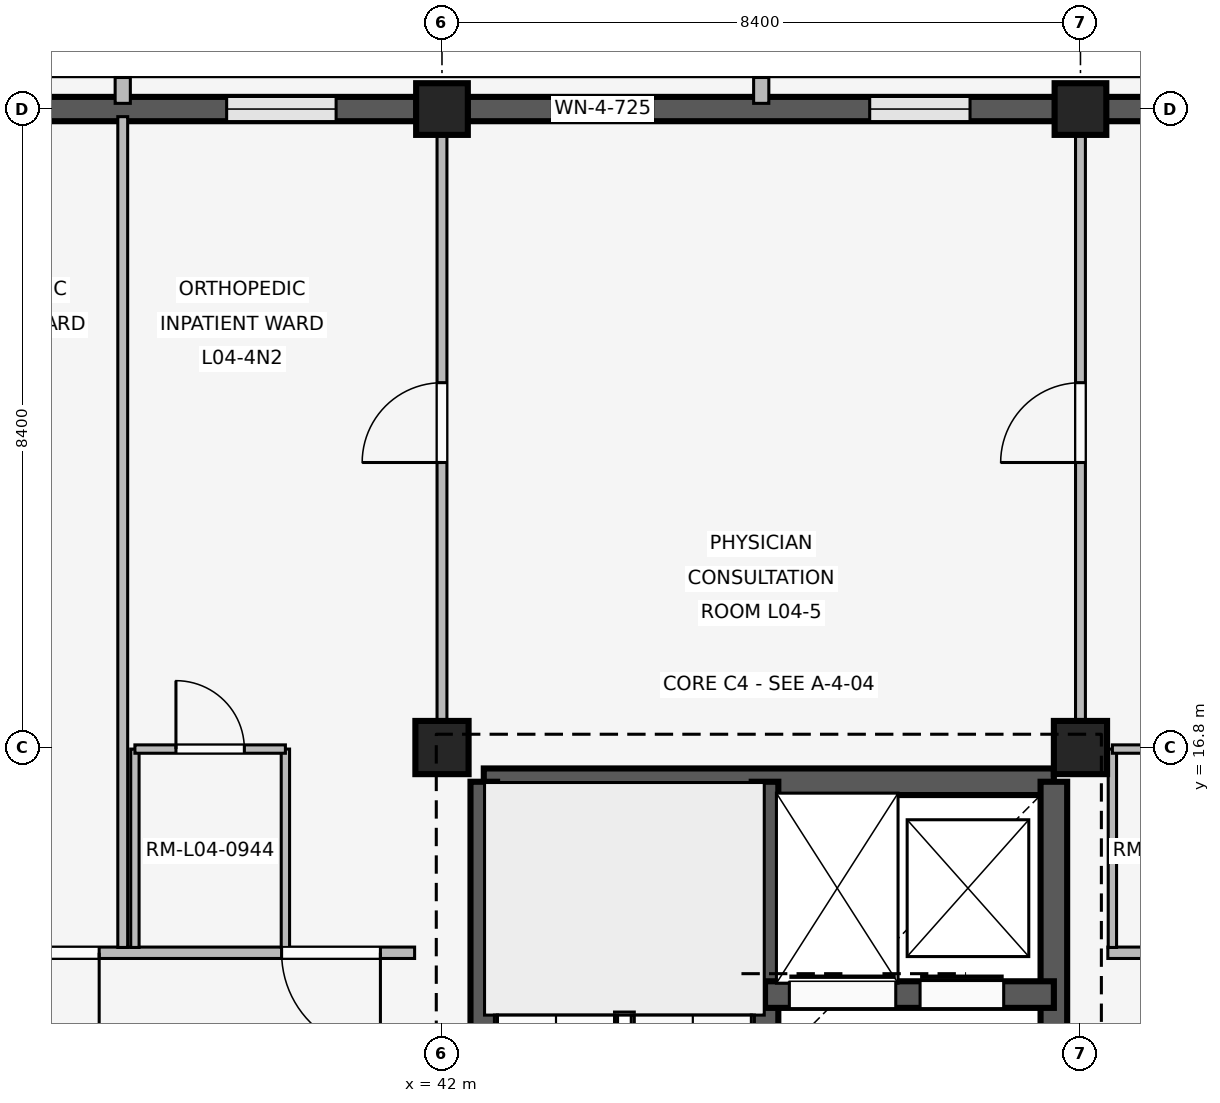
"""IFC4 building model, lengths in metres.
Left out: names, types, materials, properties, quantities, classifications, styles, units other than length and angle.
Written with IfcOpenShell. Run it as: python <this file> out.ifc"""

import sys

from ifc_helpers import new_model, si_unit, direction, frame, frame_2d, origin, origin_2d, place, context, subcontext, project, spatial, rectangle, extrude, element, fill, save


model = new_model("IFC4")
c1 = context("Model", 3, precision=1e-05, world=origin(), true_north=direction((0.0, 1.0)))
c2 = subcontext(c1, "Body", "Model", "MODEL_VIEW")
j1 = project(units=[si_unit("LENGTHUNIT", "METRE"), si_unit("PLANEANGLEUNIT", "RADIAN")], contexts=[c1])
p1 = place(None, origin())
s1 = spatial("IfcSite", under=j1, at=p1, CompositionType="ELEMENT")
p2 = place(p1, origin())
s2 = spatial("IfcBuilding", under=s1, at=p2, CompositionType="ELEMENT")
p3 = place(p2, frame((0.0, 0.0, 16.2)))
s3 = spatial("IfcBuildingStorey", under=s2, at=p3, CompositionType="ELEMENT", Elevation=16.2)
p4 = place(p3, frame((42.0, 16.8, 0.0), z_axis=(0.0, 0.0, 1.0), x_axis=(1.0, 0.0, 0.0)))
e1 = element("IfcColumn", 1, at=p4, inside=s3, PredefinedType="COLUMN", context=c2, shape_type="SweptSolid", body=[
    extrude(rectangle(XDim=0.7, YDim=0.7, at=origin_2d()), origin(), (0.0, 0.0, 1.0), 4.2),
])
p5 = place(p3, frame((42.0, 25.2, 0.0), z_axis=(0.0, 0.0, 1.0), x_axis=(1.0, 0.0, 0.0)))
e2 = element("IfcColumn", 2, at=p5, inside=s3, PredefinedType="COLUMN", context=c2, shape_type="SweptSolid", body=[
    extrude(rectangle(XDim=0.68, YDim=0.68, at=origin_2d()), origin(), (0.0, 0.0, 1.0), 4.2),
])
p6 = place(p3, frame((50.4, 16.8, 0.0), z_axis=(0.0, 0.0, 1.0), x_axis=(1.0, 0.0, 0.0)))
e3 = element("IfcColumn", 3, at=p6, inside=s3, PredefinedType="COLUMN", context=c2, shape_type="SweptSolid", body=[
    extrude(rectangle(XDim=0.7, YDim=0.7, at=origin_2d()), origin(), (0.0, 0.0, 1.0), 4.2),
])
p7 = place(p3, frame((50.4, 25.2, 0.0), z_axis=(0.0, 0.0, 1.0), x_axis=(1.0, 0.0, 0.0)))
e4 = element("IfcColumn", 4, at=p7, inside=s3, PredefinedType="COLUMN", context=c2, shape_type="SweptSolid", body=[
    extrude(rectangle(XDim=0.68, YDim=0.68, at=origin_2d()), origin(), (0.0, 0.0, 1.0), 4.2),
])
p8 = place(p3, frame((33.935, 25.2, 0.0), z_axis=(0.0, 0.0, 1.0), x_axis=(1.0, 0.0, 0.0)))
e5 = element("IfcWall", 5, at=p8, inside=s3, PredefinedType="SOLIDWALL", context=c2, shape_type="SweptSolid", body=[
    extrude(rectangle(XDim=7.73, YDim=0.32, at=frame_2d((3.865, 0.0))), origin(), (0.0, 0.0, 1.0), 3.32),
])
p9 = place(p8, frame((1.058, 0.0, 0.85)))
e6 = element("IfcOpeningElement", 6, at=p9, cuts=e5, PredefinedType="OPENING", context=c2, shape_type="SweptSolid", body=[
    extrude(rectangle(XDim=1.44, YDim=1.62, at=frame_2d((0.72, 0.81))), frame((0.0, 0.17, 0.0), z_axis=(0.0, -1.0, 0.0), x_axis=(1.0, 0.0, 0.0)), (0.0, 0.0, 1.0), 0.34),
])
p10 = place(p8, frame((5.232, 0.0, 0.85)))
e7 = element("IfcOpeningElement", 7, at=p10, cuts=e5, PredefinedType="OPENING", context=c2, shape_type="SweptSolid", body=[
    extrude(rectangle(XDim=1.44, YDim=1.62, at=frame_2d((0.72, 0.81))), frame((0.0, 0.17, 0.0), z_axis=(0.0, -1.0, 0.0), x_axis=(1.0, 0.0, 0.0)), (0.0, 0.0, 1.0), 0.34),
])
p11 = place(p3, frame((37.8, 25.275, 0.0), z_axis=(0.0, 0.0, 1.0), x_axis=(0.0, 1.0, 0.0)))
e8 = element("IfcWall", 8, at=p11, inside=s3, PredefinedType="ELEMENTEDWALL", context=c2, shape_type="SweptSolid", body=[
    extrude(rectangle(XDim=0.34, YDim=0.2, at=frame_2d((0.17, 0.0))), origin(), (0.0, 0.0, 1.0), 3.3),
])
p12 = place(p3, frame((42.335, 25.2, 0.0), z_axis=(0.0, 0.0, 1.0), x_axis=(1.0, 0.0, 0.0)))
e9 = element("IfcWall", 9, at=p12, inside=s3, PredefinedType="SOLIDWALL", context=c2, shape_type="SweptSolid", body=[
    extrude(rectangle(XDim=7.73, YDim=0.32, at=frame_2d((3.865, 0.0))), origin(), (0.0, 0.0, 1.0), 3.32),
])
p13 = place(p12, frame((1.118, 0.0, 0.85)))
e10 = element("IfcOpeningElement", 10, at=p13, cuts=e9, PredefinedType="OPENING", context=c2, shape_type="SweptSolid", body=[
    extrude(rectangle(XDim=1.32, YDim=1.58, at=frame_2d((0.66, 0.79))), frame((0.0, 0.17, 0.0), z_axis=(0.0, -1.0, 0.0), x_axis=(1.0, 0.0, 0.0)), (0.0, 0.0, 1.0), 0.34),
])
p14 = place(p12, frame((5.292, 0.0, 0.85)))
e11 = element("IfcOpeningElement", 11, at=p14, cuts=e9, PredefinedType="OPENING", context=c2, shape_type="SweptSolid", body=[
    extrude(rectangle(XDim=1.32, YDim=1.58, at=frame_2d((0.66, 0.79))), frame((0.0, 0.17, 0.0), z_axis=(0.0, -1.0, 0.0), x_axis=(1.0, 0.0, 0.0)), (0.0, 0.0, 1.0), 0.34),
])
p15 = place(p3, frame((46.2, 25.275, 0.0), z_axis=(0.0, 0.0, 1.0), x_axis=(0.0, 1.0, 0.0)))
e12 = element("IfcWall", 12, at=p15, inside=s3, PredefinedType="ELEMENTEDWALL", context=c2, shape_type="SweptSolid", body=[
    extrude(rectangle(XDim=0.34, YDim=0.2, at=frame_2d((0.17, 0.0))), origin(), (0.0, 0.0, 1.0), 3.3),
])
p16 = place(p3, frame((50.735, 25.2, 0.0), z_axis=(0.0, 0.0, 1.0), x_axis=(1.0, 0.0, 0.0)))
e13 = element("IfcWall", 13, at=p16, inside=s3, PredefinedType="SOLIDWALL", context=c2, shape_type="SweptSolid", body=[
    extrude(rectangle(XDim=7.73, YDim=0.32, at=frame_2d((3.865, 0.0))), origin(), (0.0, 0.0, 1.0), 3.32),
])
p17 = place(p16, frame((1.148, 0.0, 0.85)))
e14 = element("IfcOpeningElement", 14, at=p17, cuts=e13, PredefinedType="OPENING", context=c2, shape_type="SweptSolid", body=[
    extrude(rectangle(XDim=1.26, YDim=1.52, at=frame_2d((0.63, 0.76))), frame((0.0, 0.17, 0.0), z_axis=(0.0, -1.0, 0.0), x_axis=(1.0, 0.0, 0.0)), (0.0, 0.0, 1.0), 0.34),
])
p18 = place(p16, frame((5.322, 0.0, 0.85)))
e15 = element("IfcOpeningElement", 15, at=p18, cuts=e13, PredefinedType="OPENING", context=c2, shape_type="SweptSolid", body=[
    extrude(rectangle(XDim=1.26, YDim=1.52, at=frame_2d((0.63, 0.76))), frame((0.0, 0.17, 0.0), z_axis=(0.0, -1.0, 0.0), x_axis=(1.0, 0.0, 0.0)), (0.0, 0.0, 1.0), 0.34),
])
p19 = place(p3, frame((42.55, 16.35, 0.0), z_axis=(0.0, 0.0, 1.0), x_axis=(1.0, 0.0, 0.0)))
e16 = element("IfcWall", 16, at=p19, inside=s3, PredefinedType="SHEAR", context=c2, shape_type="SweptSolid", body=[
    extrude(rectangle(XDim=7.5, YDim=0.35, at=frame_2d((3.75, 0.0))), origin(), (0.0, 0.0, 1.0), 3.92),
])
p20 = place(p3, frame((42.55, 8.8, 0.0), z_axis=(0.0, 0.0, 1.0), x_axis=(0.0, 1.0, 0.0)))
e17 = element("IfcWall", 17, at=p20, inside=s3, PredefinedType="SHEAR", context=c2, shape_type="SweptSolid", body=[
    extrude(rectangle(XDim=7.55, YDim=0.35, at=frame_2d((3.775, 0.0))), origin(), (0.0, 0.0, 1.0), 3.92),
])
p21 = place(p20, frame((0.28, 0.0, 0.0)))
e18 = element("IfcOpeningElement", 18, at=p21, cuts=e17, PredefinedType="OPENING", context=c2, shape_type="SweptSolid", body=[
    extrude(rectangle(XDim=1.0, YDim=2.15, at=frame_2d((0.5, 1.075))), frame((0.0, 0.185, 0.0), z_axis=(0.0, -1.0, 0.0), x_axis=(1.0, 0.0, 0.0)), (0.0, 0.0, 1.0), 0.37),
])
p22 = place(p3, frame((50.05, 8.8, 0.0), z_axis=(0.0, 0.0, 1.0), x_axis=(0.0, 1.0, 0.0)))
e19 = element("IfcWall", 19, at=p22, inside=s3, PredefinedType="SHEAR", context=c2, shape_type="SweptSolid", body=[
    extrude(rectangle(XDim=7.55, YDim=0.35, at=frame_2d((3.775, 0.0))), origin(), (0.0, 0.0, 1.0), 3.92),
])
p23 = place(p22, frame((2.4, 0.0, 0.0)))
e20 = element("IfcOpeningElement", 20, at=p23, cuts=e19, PredefinedType="OPENING", context=c2, shape_type="SweptSolid", body=[
    extrude(rectangle(XDim=1.2, YDim=2.2, at=frame_2d((0.6, 1.1))), frame((0.0, 0.185, 0.0), z_axis=(0.0, -1.0, 0.0), x_axis=(1.0, 0.0, 0.0)), (0.0, 0.0, 1.0), 0.37),
])
p24 = place(p3, frame((46.25, 8.8, 0.0), z_axis=(0.0, 0.0, 1.0), x_axis=(0.0, 1.0, 0.0)))
e21 = element("IfcWall", 21, at=p24, inside=s3, PredefinedType="SHEAR", context=c2, shape_type="SweptSolid", body=[
    extrude(rectangle(XDim=7.55, YDim=0.35, at=frame_2d((3.775, 0.0))), origin(), (0.0, 0.0, 1.0), 3.92),
])
p25 = place(p24, frame((0.28, 0.0, 0.0)))
e22 = element("IfcOpeningElement", 22, at=p25, cuts=e21, PredefinedType="OPENING", context=c2, shape_type="SweptSolid", body=[
    extrude(rectangle(XDim=1.0, YDim=2.15, at=frame_2d((0.5, 1.075))), frame((0.0, 0.185, 0.0), z_axis=(0.0, -1.0, 0.0), x_axis=(1.0, 0.0, 0.0)), (0.0, 0.0, 1.0), 0.37),
])
p26 = place(p3, frame((46.25, 13.55, 0.0), z_axis=(0.0, 0.0, 1.0), x_axis=(1.0, 0.0, 0.0)))
e23 = element("IfcWall", 23, at=p26, inside=s3, PredefinedType="SHEAR", context=c2, shape_type="SweptSolid", body=[
    extrude(rectangle(XDim=3.8, YDim=0.35, at=frame_2d((1.9, 0.0))), origin(), (0.0, 0.0, 1.0), 3.92),
])
p27 = place(p26, frame((0.32, 0.0, 0.0)))
e24 = element("IfcOpeningElement", 24, at=p27, cuts=e23, PredefinedType="OPENING", context=c2, shape_type="SweptSolid", body=[
    extrude(rectangle(XDim=1.4, YDim=2.25, at=frame_2d((0.7, 1.125))), frame((0.0, 0.185, 0.0), z_axis=(0.0, -1.0, 0.0), x_axis=(1.0, 0.0, 0.0)), (0.0, 0.0, 1.0), 0.37),
])
p28 = place(p26, frame((2.04, 0.0, 0.0)))
e25 = element("IfcOpeningElement", 25, at=p28, cuts=e23, PredefinedType="OPENING", context=c2, shape_type="SweptSolid", body=[
    extrude(rectangle(XDim=1.1, YDim=2.15, at=frame_2d((0.55, 1.075))), frame((0.0, 0.185, 0.0), z_axis=(0.0, -1.0, 0.0), x_axis=(1.0, 0.0, 0.0)), (0.0, 0.0, 1.0), 0.37),
])
p29 = place(p3, frame((41.64, 14.1, 0.0), z_axis=(0.0, 0.0, 1.0), x_axis=(-1.0, 0.0, 0.0)))
e26 = element("IfcWall", 26, at=p29, inside=s3, PredefinedType="PARTITIONING", context=c2, shape_type="SweptSolid", body=[
    extrude(rectangle(XDim=7.96, YDim=0.15, at=frame_2d((3.98, 0.0))), origin(), (0.0, 0.0, 1.0), 3.3),
])
p30 = place(p29, frame((0.45, 0.0, 0.0)))
e27 = element("IfcOpeningElement", 27, at=p30, cuts=e26, PredefinedType="OPENING", context=c2, shape_type="SweptSolid", body=[
    extrude(rectangle(XDim=1.3, YDim=2.25, at=frame_2d((0.65, 1.125))), frame((0.0, 0.085, 0.0), z_axis=(0.0, -1.0, 0.0), x_axis=(1.0, 0.0, 0.0)), (0.0, 0.0, 1.0), 0.17),
])
p31 = place(p29, frame((4.15, 0.0, 0.0)))
e28 = element("IfcOpeningElement", 28, at=p31, cuts=e26, PredefinedType="OPENING", context=c2, shape_type="SweptSolid", body=[
    extrude(rectangle(XDim=1.3, YDim=2.25, at=frame_2d((0.65, 1.125))), frame((0.0, 0.085, 0.0), z_axis=(0.0, -1.0, 0.0), x_axis=(1.0, 0.0, 0.0)), (0.0, 0.0, 1.0), 0.17),
])
p32 = place(p3, frame((37.8, 14.17, 0.0), z_axis=(0.0, 0.0, 1.0), x_axis=(0.0, 1.0, 0.0)))
e29 = element("IfcWall", 29, at=p32, inside=s3, PredefinedType="PARTITIONING", context=c2, shape_type="SweptSolid", body=[
    extrude(rectangle(XDim=10.93, YDim=0.13, at=frame_2d((5.465, 0.0))), origin(), (0.0, 0.0, 1.0), 3.3),
])
for number, where, z_axis, x_axis in (
    (30, (37.96, 14.17, 0.0), (0.0, 0.0, 1.0), (0.0, 1.0, 0.0)),
    (31, (39.94, 14.17, 0.0), (0.0, 0.0, 1.0), (0.0, 1.0, 0.0)),
):
    element("IfcWall", number, at=place(p3, frame(where, z_axis=z_axis, x_axis=x_axis)), inside=s3, PredefinedType="PARTITIONING", context=c2, shape_type="SweptSolid", body=[
        extrude(rectangle(XDim=2.61, YDim=0.11, at=frame_2d((1.305, 0.0))), origin(), (0.0, 0.0, 1.0), 3.3),
    ])
p33 = place(p3, frame((37.96, 16.78, 0.0), z_axis=(0.0, 0.0, 1.0), x_axis=(1.0, 0.0, 0.0)))
e32 = element("IfcWall", 32, at=p33, inside=s3, PredefinedType="PARTITIONING", context=c2, shape_type="SweptSolid", body=[
    extrude(rectangle(XDim=1.98, YDim=0.11, at=frame_2d((0.99, 0.0))), origin(), (0.0, 0.0, 1.0), 3.3),
])
p34 = place(p33, frame((0.54, 0.0, 0.0)))
e33 = element("IfcOpeningElement", 33, at=p34, cuts=e32, PredefinedType="OPENING", context=c2, shape_type="SweptSolid", body=[
    extrude(rectangle(XDim=0.9, YDim=2.1, at=frame_2d((0.45, 1.05))), frame((0.0, 0.065, 0.0), z_axis=(0.0, -1.0, 0.0), x_axis=(1.0, 0.0, 0.0)), (0.0, 0.0, 1.0), 0.13),
])
p35 = place(p3, frame((42.0, 17.15, 0.0), z_axis=(0.0, 0.0, 1.0), x_axis=(0.0, 1.0, 0.0)))
e34 = element("IfcWall", 34, at=p35, inside=s3, PredefinedType="PARTITIONING", context=c2, shape_type="SweptSolid", body=[
    extrude(rectangle(XDim=7.91, YDim=0.13, at=frame_2d((3.955, 0.0))), origin(), (0.0, 0.0, 1.0), 3.3),
])
p36 = place(p35, frame((3.4, 0.0, 0.0)))
e35 = element("IfcOpeningElement", 35, at=p36, cuts=e34, PredefinedType="OPENING", context=c2, shape_type="SweptSolid", body=[
    extrude(rectangle(XDim=1.05, YDim=2.2, at=frame_2d((0.525, 1.1))), frame((0.0, 0.075, 0.0), z_axis=(0.0, -1.0, 0.0), x_axis=(1.0, 0.0, 0.0)), (0.0, 0.0, 1.0), 0.15),
])
p37 = place(p3, frame((50.4, 17.15, 0.0), z_axis=(0.0, 0.0, 1.0), x_axis=(0.0, 1.0, 0.0)))
e36 = element("IfcWall", 36, at=p37, inside=s3, PredefinedType="PARTITIONING", context=c2, shape_type="SweptSolid", body=[
    extrude(rectangle(XDim=7.91, YDim=0.13, at=frame_2d((3.955, 0.0))), origin(), (0.0, 0.0, 1.0), 3.3),
])
p38 = place(p37, frame((3.4, 0.0, 0.0)))
e37 = element("IfcOpeningElement", 37, at=p38, cuts=e36, PredefinedType="OPENING", context=c2, shape_type="SweptSolid", body=[
    extrude(rectangle(XDim=1.05, YDim=2.2, at=frame_2d((0.525, 1.1))), frame((0.0, 0.075, 0.0), z_axis=(0.0, -1.0, 0.0), x_axis=(1.0, 0.0, 0.0)), (0.0, 0.0, 1.0), 0.15),
])
p39 = place(p3, frame((58.72, 14.1, 0.0), z_axis=(0.0, 0.0, 1.0), x_axis=(-1.0, 0.0, 0.0)))
e38 = element("IfcWall", 38, at=p39, inside=s3, PredefinedType="PARTITIONING", context=c2, shape_type="SweptSolid", body=[
    extrude(rectangle(XDim=7.96, YDim=0.15, at=frame_2d((3.98, 0.0))), origin(), (0.0, 0.0, 1.0), 3.3),
])
p40 = place(p39, frame((0.73, 0.0, 0.0)))
e39 = element("IfcOpeningElement", 39, at=p40, cuts=e38, PredefinedType="OPENING", context=c2, shape_type="SweptSolid", body=[
    extrude(rectangle(XDim=1.3, YDim=2.25, at=frame_2d((0.65, 1.125))), frame((0.0, 0.085, 0.0), z_axis=(0.0, -1.0, 0.0), x_axis=(1.0, 0.0, 0.0)), (0.0, 0.0, 1.0), 0.17),
])
p41 = place(p39, frame((4.43, 0.0, 0.0)))
e40 = element("IfcOpeningElement", 40, at=p41, cuts=e38, PredefinedType="OPENING", context=c2, shape_type="SweptSolid", body=[
    extrude(rectangle(XDim=1.3, YDim=2.25, at=frame_2d((0.65, 1.125))), frame((0.0, 0.085, 0.0), z_axis=(0.0, -1.0, 0.0), x_axis=(1.0, 0.0, 0.0)), (0.0, 0.0, 1.0), 0.17),
])
p42 = place(p3, frame((50.82, 14.17, 0.0), z_axis=(0.0, 0.0, 1.0), x_axis=(0.0, 1.0, 0.0)))
e41 = element("IfcWall", 41, at=p42, inside=s3, PredefinedType="PARTITIONING", context=c2, shape_type="SweptSolid", body=[
    extrude(rectangle(XDim=2.61, YDim=0.11, at=frame_2d((1.305, 0.0))), origin(), (0.0, 0.0, 1.0), 3.3),
])
p43 = place(p3, frame((50.82, 16.78, 0.0), z_axis=(0.0, 0.0, 1.0), x_axis=(1.0, 0.0, 0.0)))
e42 = element("IfcWall", 42, at=p43, inside=s3, PredefinedType="PARTITIONING", context=c2, shape_type="SweptSolid", body=[
    extrude(rectangle(XDim=1.98, YDim=0.11, at=frame_2d((0.99, 0.0))), origin(), (0.0, 0.0, 1.0), 3.3),
])
p44 = place(p43, frame((0.54, 0.0, 0.0)))
e43 = element("IfcOpeningElement", 43, at=p44, cuts=e42, PredefinedType="OPENING", context=c2, shape_type="SweptSolid", body=[
    extrude(rectangle(XDim=0.9, YDim=2.1, at=frame_2d((0.45, 1.05))), frame((0.0, 0.065, 0.0), z_axis=(0.0, -1.0, 0.0), x_axis=(1.0, 0.0, 0.0)), (0.0, 0.0, 1.0), 0.13),
])
p45 = place(p10, origin())
e44 = element("IfcWindow", 44, at=p45, inside=s3, PartitioningType="SINGLE_PANEL", PredefinedType="WINDOW", context=c2, shape_type="SweptSolid", body=[
    extrude(rectangle(XDim=1.44, YDim=1.62, at=frame_2d((0.72, 0.81))), frame((0.0, 0.03, 0.0), z_axis=(0.0, -1.0, 0.0), x_axis=(1.0, 0.0, 0.0)), (0.0, 0.0, 1.0), 0.06),
])
fill(e7, e44)
p46 = place(p13, origin())
e45 = element("IfcWindow", 45, at=p46, inside=s3, PartitioningType="SINGLE_PANEL", PredefinedType="WINDOW", context=c2, shape_type="SweptSolid", body=[
    extrude(rectangle(XDim=1.32, YDim=1.58, at=frame_2d((0.66, 0.79))), frame((0.0, 0.03, 0.0), z_axis=(0.0, -1.0, 0.0), x_axis=(1.0, 0.0, 0.0)), (0.0, 0.0, 1.0), 0.06),
])
fill(e10, e45)
p47 = place(p14, origin())
e46 = element("IfcWindow", 46, at=p47, inside=s3, PartitioningType="SINGLE_PANEL", PredefinedType="WINDOW", context=c2, shape_type="SweptSolid", body=[
    extrude(rectangle(XDim=1.32, YDim=1.58, at=frame_2d((0.66, 0.79))), frame((0.0, 0.03, 0.0), z_axis=(0.0, -1.0, 0.0), x_axis=(1.0, 0.0, 0.0)), (0.0, 0.0, 1.0), 0.06),
])
fill(e11, e46)
p48 = place(p27, origin())
e47 = element("IfcDoor", 47, at=p48, inside=s3, OperationType="SLIDING_TO_LEFT", PredefinedType="DOOR", context=c2, shape_type="SweptSolid", body=[
    extrude(rectangle(XDim=1.4, YDim=2.25, at=frame_2d((0.7, 1.125))), frame((0.0, 0.025, 0.0), z_axis=(0.0, -1.0, 0.0), x_axis=(1.0, 0.0, 0.0)), (0.0, 0.0, 1.0), 0.05),
])
fill(e24, e47)
p49 = place(p28, origin())
e48 = element("IfcDoor", 48, at=p49, inside=s3, OperationType="SLIDING_TO_LEFT", PredefinedType="DOOR", context=c2, shape_type="SweptSolid", body=[
    extrude(rectangle(XDim=1.1, YDim=2.15, at=frame_2d((0.55, 1.075))), frame((0.0, 0.025, 0.0), z_axis=(0.0, -1.0, 0.0), x_axis=(1.0, 0.0, 0.0)), (0.0, 0.0, 1.0), 0.05),
])
fill(e25, e48)
p50 = place(p30, origin())
e49 = element("IfcDoor", 49, at=p50, inside=s3, OperationType="SINGLE_SWING_LEFT", PredefinedType="DOOR", context=c2, shape_type="SweptSolid", body=[
    extrude(rectangle(XDim=1.3, YDim=2.25, at=frame_2d((0.65, 1.125))), frame((0.0, 0.025, 0.0), z_axis=(0.0, -1.0, 0.0), x_axis=(1.0, 0.0, 0.0)), (0.0, 0.0, 1.0), 0.05),
])
fill(e27, e49)
p51 = place(p31, origin())
e50 = element("IfcDoor", 50, at=p51, inside=s3, OperationType="SINGLE_SWING_LEFT", PredefinedType="DOOR", context=c2, shape_type="SweptSolid", body=[
    extrude(rectangle(XDim=1.3, YDim=2.25, at=frame_2d((0.65, 1.125))), frame((0.0, 0.025, 0.0), z_axis=(0.0, -1.0, 0.0), x_axis=(1.0, 0.0, 0.0)), (0.0, 0.0, 1.0), 0.05),
])
fill(e28, e50)
p52 = place(p34, origin())
e51 = element("IfcDoor", 51, at=p52, inside=s3, OperationType="SINGLE_SWING_LEFT", PredefinedType="DOOR", context=c2, shape_type="SweptSolid", body=[
    extrude(rectangle(XDim=0.9, YDim=2.1, at=frame_2d((0.45, 1.05))), frame((0.0, 0.025, 0.0), z_axis=(0.0, -1.0, 0.0), x_axis=(1.0, 0.0, 0.0)), (0.0, 0.0, 1.0), 0.05),
])
fill(e33, e51)
p53 = place(p36, origin())
e52 = element("IfcDoor", 52, at=p53, inside=s3, OperationType="SINGLE_SWING_LEFT", PredefinedType="DOOR", context=c2, shape_type="SweptSolid", body=[
    extrude(rectangle(XDim=1.05, YDim=2.2, at=frame_2d((0.525, 1.1))), frame((0.0, 0.025, 0.0), z_axis=(0.0, -1.0, 0.0), x_axis=(1.0, 0.0, 0.0)), (0.0, 0.0, 1.0), 0.05),
])
fill(e35, e52)
p54 = place(p38, origin())
e53 = element("IfcDoor", 53, at=p54, inside=s3, OperationType="SINGLE_SWING_LEFT", PredefinedType="DOOR", context=c2, shape_type="SweptSolid", body=[
    extrude(rectangle(XDim=1.05, YDim=2.2, at=frame_2d((0.525, 1.1))), frame((0.0, 0.025, 0.0), z_axis=(0.0, -1.0, 0.0), x_axis=(1.0, 0.0, 0.0)), (0.0, 0.0, 1.0), 0.05),
])
fill(e37, e53)
save(model, sys.argv[1])
